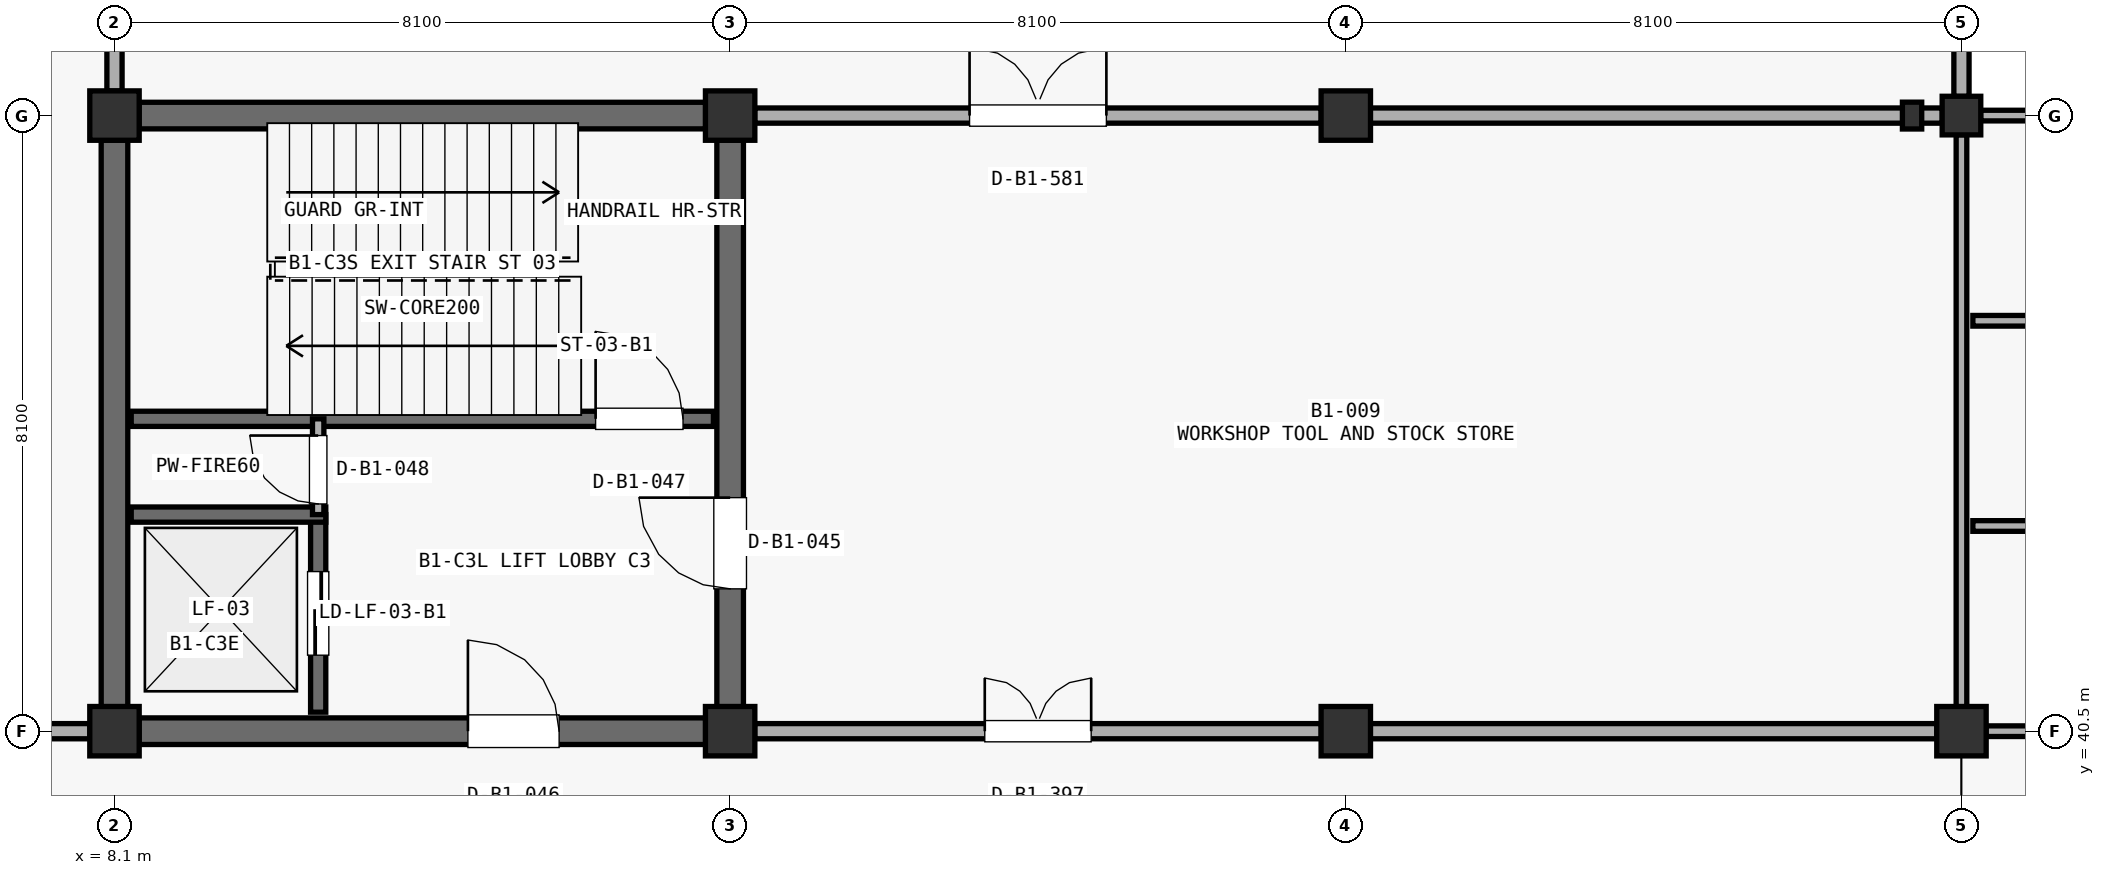
"""IFC4 building model, lengths in metres.
Left out: names, types, materials, properties, quantities, classifications, styles, units other than length and angle.
Written with IfcOpenShell. Run it as: python <this file> out.ifc"""

import sys

from ifc_helpers import new_model, si_unit, direction, frame, frame_2d, origin, origin_2d, place, context, subcontext, project, spatial, rectangle, hollow_circle, i_section, extrude, element, fill, save


model = new_model("IFC4")
c1 = context("Model", 3, precision=1e-05, world=origin(), true_north=direction((0.0, 1.0)))
c2 = subcontext(c1, "Body", "Model", "MODEL_VIEW")
j1 = project(units=[si_unit("LENGTHUNIT", "METRE"), si_unit("PLANEANGLEUNIT", "RADIAN")], contexts=[c1])
p1 = place(None, origin())
s1 = spatial("IfcSite", under=j1, at=p1, CompositionType="ELEMENT")
p2 = place(p1, origin())
s2 = spatial("IfcBuilding", under=s1, at=p2, CompositionType="ELEMENT")
p3 = place(p2, frame((0.0, 0.0, -5.1)))
s3 = spatial("IfcBuildingStorey", under=s2, at=p3, CompositionType="ELEMENT", Elevation=-5.1)
for number, where, z_axis, x_axis in (
    (1, (8.1, 40.5, 0.0), (0.0, 0.0, 1.0), (1.0, 0.0, 0.0)),
    (2, (8.1, 48.6, 0.0), (0.0, 0.0, 1.0), (1.0, 0.0, 0.0)),
    (3, (16.2, 40.5, 0.0), (0.0, 0.0, 1.0), (1.0, 0.0, 0.0)),
    (4, (16.2, 48.6, 0.0), (0.0, 0.0, 1.0), (1.0, 0.0, 0.0)),
    (5, (24.3, 40.5, 0.0), (0.0, 0.0, 1.0), (1.0, 0.0, 0.0)),
    (6, (24.3, 48.6, 0.0), (0.0, 0.0, 1.0), (1.0, 0.0, 0.0)),
    (7, (32.4, 40.5, 0.0), (0.0, 0.0, 1.0), (1.0, 0.0, 0.0)),
):
    element("IfcColumn", number, at=place(p3, frame(where, z_axis=z_axis, x_axis=x_axis)), inside=s3, PredefinedType="COLUMN", context=c2, shape_type="SweptSolid", body=[
        extrude(rectangle(XDim=0.65, YDim=0.65, at=origin_2d()), origin(), (0.0, 0.0, 1.0), 5.1),
    ])
p4 = place(p3, frame((32.4, 48.6, 0.0), z_axis=(0.0, 0.0, 1.0), x_axis=(1.0, 0.0, 0.0)))
e8 = element("IfcColumn", 8, at=p4, inside=s3, PredefinedType="COLUMN", context=c2, shape_type="SweptSolid", body=[
    extrude(hollow_circle(Radius=0.254, WallThickness=0.019, at=origin_2d()), origin(), (0.0, 0.0, 1.0), 5.1),
])
p5 = place(p3, frame((31.75, 48.6, 0.0), z_axis=(0.0, 0.0, 1.0), x_axis=(1.0, 0.0, 0.0)))
e9 = element("IfcColumn", 9, at=p5, inside=s3, PredefinedType="PILASTER", context=c2, shape_type="SweptSolid", body=[
    extrude(i_section(OverallWidth=0.254, OverallDepth=0.353, WebThickness=0.01, FlangeThickness=0.016, FilletRadius=0.016, at=origin_2d()), origin(), (0.0, 0.0, 1.0), 4.724),
])
p6 = place(p3, frame((8.423, 48.6, 0.0), z_axis=(0.0, 0.0, 1.0), x_axis=(1.0, 0.0, 0.0)))
e10 = element("IfcWall", 10, at=p6, inside=s3, PredefinedType="SHEAR", context=c2, shape_type="SweptSolid", body=[
    extrude(rectangle(XDim=7.454, YDim=0.35, at=frame_2d((3.727, 0.0))), origin(), (0.0, 0.0, 1.0), 4.722),
])
p7 = place(p3, frame((8.1, 40.823, 0.0), z_axis=(0.0, 0.0, 1.0), x_axis=(0.0, 1.0, 0.0)))
e11 = element("IfcWall", 11, at=p7, inside=s3, PredefinedType="SHEAR", context=c2, shape_type="SweptSolid", body=[
    extrude(rectangle(XDim=7.454, YDim=0.35, at=frame_2d((3.727, 0.0))), origin(), (0.0, 0.0, 1.0), 4.722),
])
p8 = place(p3, frame((16.2, 40.823, 0.0), z_axis=(0.0, 0.0, 1.0), x_axis=(0.0, 1.0, 0.0)))
e12 = element("IfcWall", 12, at=p8, inside=s3, PredefinedType="SHEAR", context=c2, shape_type="SweptSolid", body=[
    extrude(rectangle(XDim=7.454, YDim=0.35, at=frame_2d((3.727, 0.0))), origin(), (0.0, 0.0, 1.0), 4.722),
])
p9 = place(p8, frame((1.55, 0.0, 0.0)))
e13 = element("IfcOpeningElement", 13, at=p9, cuts=e12, PredefinedType="OPENING", context=c2, shape_type="SweptSolid", body=[
    extrude(rectangle(XDim=1.2, YDim=2.2, at=frame_2d((0.6, 1.1))), frame((0.0, 0.185, 0.0), z_axis=(0.0, -1.0, 0.0), x_axis=(1.0, 0.0, 0.0)), (0.0, 0.0, 1.0), 0.37),
])
p10 = place(p3, frame((8.423, 40.5, 0.0), z_axis=(0.0, 0.0, 1.0), x_axis=(1.0, 0.0, 0.0)))
e14 = element("IfcWall", 14, at=p10, inside=s3, PredefinedType="SHEAR", context=c2, shape_type="SweptSolid", body=[
    extrude(rectangle(XDim=7.454, YDim=0.35, at=frame_2d((3.727, 0.0))), origin(), (0.0, 0.0, 1.0), 4.722),
])
p11 = place(p10, frame((4.327, 0.0, 0.0)))
e15 = element("IfcOpeningElement", 15, at=p11, cuts=e14, PredefinedType="OPENING", context=c2, shape_type="SweptSolid", body=[
    extrude(rectangle(XDim=1.2, YDim=2.2, at=frame_2d((0.6, 1.1))), frame((0.0, 0.185, 0.0), z_axis=(0.0, -1.0, 0.0), x_axis=(1.0, 0.0, 0.0)), (0.0, 0.0, 1.0), 0.37),
])
p12 = place(p3, frame((8.32, 44.61, 0.0), z_axis=(0.0, 0.0, 1.0), x_axis=(1.0, 0.0, 0.0)))
e16 = element("IfcWall", 16, at=p12, inside=s3, PredefinedType="SHEAR", context=c2, shape_type="SweptSolid", body=[
    extrude(rectangle(XDim=7.66, YDim=0.2, at=frame_2d((3.83, 0.0))), origin(), (0.0, 0.0, 1.0), 4.722),
])
p13 = place(p12, frame((6.11, 0.0, 0.0)))
e17 = element("IfcOpeningElement", 17, at=p13, cuts=e16, PredefinedType="OPENING", context=c2, shape_type="SweptSolid", body=[
    extrude(rectangle(XDim=1.15, YDim=2.2, at=frame_2d((0.575, 1.1))), frame((0.0, 0.11, 0.0), z_axis=(0.0, -1.0, 0.0), x_axis=(1.0, 0.0, 0.0)), (0.0, 0.0, 1.0), 0.22),
])
p14 = place(p3, frame((10.78, 40.75, 0.0), z_axis=(0.0, 0.0, 1.0), x_axis=(0.0, 1.0, 0.0)))
e18 = element("IfcWall", 18, at=p14, inside=s3, PredefinedType="SHEAR", context=c2, shape_type="SweptSolid", body=[
    extrude(rectangle(XDim=2.6, YDim=0.2, at=frame_2d((1.3, 0.0))), origin(), (0.0, 0.0, 1.0), 4.722),
])
p15 = place(p14, frame((0.75, 0.0, 0.0)))
e19 = element("IfcOpeningElement", 19, at=p15, cuts=e18, PredefinedType="OPENING", context=c2, shape_type="SweptSolid", body=[
    extrude(rectangle(XDim=1.1, YDim=2.2, at=frame_2d((0.55, 1.1))), frame((0.0, 0.11, 0.0), z_axis=(0.0, -1.0, 0.0), x_axis=(1.0, 0.0, 0.0)), (0.0, 0.0, 1.0), 0.22),
])
p16 = place(p3, frame((8.32, 43.35, 0.0), z_axis=(0.0, 0.0, 1.0), x_axis=(1.0, 0.0, 0.0)))
e20 = element("IfcWall", 20, at=p16, inside=s3, PredefinedType="SHEAR", context=c2, shape_type="SweptSolid", body=[
    extrude(rectangle(XDim=2.56, YDim=0.2, at=frame_2d((1.28, 0.0))), origin(), (0.0, 0.0, 1.0), 4.722),
])
p17 = place(p3, frame((10.78, 43.35, 0.0), z_axis=(0.0, 0.0, 1.0), x_axis=(0.0, 1.0, 0.0)))
e21 = element("IfcWall", 21, at=p17, inside=s3, PredefinedType="PARTITIONING", context=c2, shape_type="SweptSolid", body=[
    extrude(rectangle(XDim=1.26, YDim=0.15, at=frame_2d((0.63, 0.0))), origin(), (0.0, 0.0, 1.0), 4.722),
])
p18 = place(p17, frame((0.14, 0.0, 0.0)))
e22 = element("IfcOpeningElement", 22, at=p18, cuts=e21, PredefinedType="OPENING", context=c2, shape_type="SweptSolid", body=[
    extrude(rectangle(XDim=0.9, YDim=2.15, at=frame_2d((0.45, 1.075))), frame((0.0, 0.085, 0.0), z_axis=(0.0, -1.0, 0.0), x_axis=(1.0, 0.0, 0.0)), (0.0, 0.0, 1.0), 0.17),
])
p19 = place(p3, frame((32.723, 40.5, 0.0), z_axis=(0.0, 0.0, 1.0), x_axis=(1.0, 0.0, 0.0)))
e23 = element("IfcWall", 23, at=p19, inside=s3, PredefinedType="PARTITIONING", context=c2, shape_type="SweptSolid", body=[
    extrude(rectangle(XDim=7.454, YDim=0.14, at=frame_2d((3.727, 0.0))), origin(), (0.0, 0.0, 1.0), 4.424),
])
p20 = place(p3, frame((32.652, 48.6, 0.0), z_axis=(0.0, 0.0, 1.0), x_axis=(1.0, 0.0, 0.0)))
e24 = element("IfcWall", 24, at=p20, inside=s3, PredefinedType="PARTITIONING", context=c2, shape_type="SweptSolid", body=[
    extrude(rectangle(XDim=7.525, YDim=0.14, at=frame_2d((3.762, 0.0))), origin(), (0.0, 0.0, 1.0), 4.231),
])
p21 = place(p3, frame((32.4, 40.823, 0.0), z_axis=(0.0, 0.0, 1.0), x_axis=(0.0, 1.0, 0.0)))
e25 = element("IfcWall", 25, at=p21, inside=s3, PredefinedType="PARTITIONING", context=c2, shape_type="SweptSolid", body=[
    extrude(rectangle(XDim=7.525, YDim=0.14, at=frame_2d((3.762, 0.0))), origin(), (0.0, 0.0, 1.0), 4.364),
])
for number, where, z_axis, x_axis in (
    (26, (32.55, 43.2, 0.0), (0.0, 0.0, 1.0), (1.0, 0.0, 0.0)),
    (27, (32.55, 45.9, 0.0), (0.0, 0.0, 1.0), (1.0, 0.0, 0.0)),
):
    element("IfcWall", number, at=place(p3, frame(where, z_axis=z_axis, x_axis=x_axis)), inside=s3, PredefinedType="PARTITIONING", context=c2, shape_type="SweptSolid", body=[
        extrude(rectangle(XDim=5.18, YDim=0.14, at=frame_2d((2.59, 0.0))), origin(), (0.0, 0.0, 1.0), 4.782),
    ])
p22 = place(p3, frame((32.4, 48.852, 0.0), z_axis=(0.0, 0.0, 1.0), x_axis=(0.0, 1.0, 0.0)))
e28 = element("IfcWall", 28, at=p22, inside=s3, PredefinedType="PARTITIONING", context=c2, shape_type="SweptSolid", body=[
    extrude(rectangle(XDim=7.673, YDim=0.2, at=frame_2d((3.837, 0.0))), origin(), (0.0, 0.0, 1.0), 4.173),
])
p23 = place(p3, frame((16.523, 48.6, 0.0), z_axis=(0.0, 0.0, 1.0), x_axis=(1.0, 0.0, 0.0)))
e29 = element("IfcWall", 29, at=p23, inside=s3, PredefinedType="PARTITIONING", context=c2, shape_type="SweptSolid", body=[
    extrude(rectangle(XDim=7.454, YDim=0.2, at=frame_2d((3.727, 0.0))), origin(), (0.0, 0.0, 1.0), 4.456),
])
p24 = place(p23, frame((2.827, 0.0, 0.0)))
e30 = element("IfcOpeningElement", 30, at=p24, cuts=e29, PredefinedType="OPENING", context=c2, shape_type="SweptSolid", body=[
    extrude(rectangle(XDim=1.8, YDim=2.4, at=frame_2d((0.9, 1.2))), frame((0.0, 0.11, 0.0), z_axis=(0.0, -1.0, 0.0), x_axis=(1.0, 0.0, 0.0)), (0.0, 0.0, 1.0), 0.22),
])
p25 = place(p3, frame((24.623, 48.6, 0.0), z_axis=(0.0, 0.0, 1.0), x_axis=(1.0, 0.0, 0.0)))
e31 = element("IfcWall", 31, at=p25, inside=s3, PredefinedType="PARTITIONING", context=c2, shape_type="SweptSolid", body=[
    extrude(rectangle(XDim=7.525, YDim=0.2, at=frame_2d((3.762, 0.0))), origin(), (0.0, 0.0, 1.0), 4.307),
])
p26 = place(p3, frame((8.1, 48.923, 0.0), z_axis=(0.0, 0.0, 1.0), x_axis=(0.0, 1.0, 0.0)))
e32 = element("IfcWall", 32, at=p26, inside=s3, PredefinedType="PARTITIONING", context=c2, shape_type="SweptSolid", body=[
    extrude(rectangle(XDim=7.777, YDim=0.2, at=frame_2d((3.888, 0.0))), origin(), (0.0, 0.0, 1.0), 4.722),
])
p27 = place(p26, frame((3.188, 0.0, 0.0)))
e33 = element("IfcOpeningElement", 33, at=p27, cuts=e32, PredefinedType="OPENING", context=c2, shape_type="SweptSolid", body=[
    extrude(rectangle(XDim=1.4, YDim=2.2, at=frame_2d((0.7, 1.1))), frame((0.0, 0.11, 0.0), z_axis=(0.0, -1.0, 0.0), x_axis=(1.0, 0.0, 0.0)), (0.0, 0.0, 1.0), 0.22),
])
p28 = place(p3, frame((16.523, 40.5, 0.0), z_axis=(0.0, 0.0, 1.0), x_axis=(1.0, 0.0, 0.0)))
e34 = element("IfcWall", 34, at=p28, inside=s3, PredefinedType="PARTITIONING", context=c2, shape_type="SweptSolid", body=[
    extrude(rectangle(XDim=7.454, YDim=0.2, at=frame_2d((3.727, 0.0))), origin(), (0.0, 0.0, 1.0), 4.405),
])
p29 = place(p28, frame((3.027, 0.0, 0.0)))
e35 = element("IfcOpeningElement", 35, at=p29, cuts=e34, PredefinedType="OPENING", context=c2, shape_type="SweptSolid", body=[
    extrude(rectangle(XDim=1.4, YDim=2.2, at=frame_2d((0.7, 1.1))), frame((0.0, 0.11, 0.0), z_axis=(0.0, -1.0, 0.0), x_axis=(1.0, 0.0, 0.0)), (0.0, 0.0, 1.0), 0.22),
])
p30 = place(p3, frame((24.623, 40.5, 0.0), z_axis=(0.0, 0.0, 1.0), x_axis=(1.0, 0.0, 0.0)))
e36 = element("IfcWall", 36, at=p30, inside=s3, PredefinedType="PARTITIONING", context=c2, shape_type="SweptSolid", body=[
    extrude(rectangle(XDim=7.454, YDim=0.2, at=frame_2d((3.727, 0.0))), origin(), (0.0, 0.0, 1.0), 4.456),
])
p31 = place(p3, frame((0.323, 40.5, 0.0), z_axis=(0.0, 0.0, 1.0), x_axis=(1.0, 0.0, 0.0)))
e37 = element("IfcWall", 37, at=p31, inside=s3, PredefinedType="PARTITIONING", context=c2, shape_type="SweptSolid", body=[
    extrude(rectangle(XDim=7.454, YDim=0.2, at=frame_2d((3.727, 0.0))), origin(), (0.0, 0.0, 1.0), 4.364),
])
p32 = place(p31, frame((2.827, 0.0, 0.0)))
e38 = element("IfcOpeningElement", 38, at=p32, cuts=e37, PredefinedType="OPENING", context=c2, shape_type="SweptSolid", body=[
    extrude(rectangle(XDim=1.8, YDim=2.2, at=frame_2d((0.9, 1.1))), frame((0.0, 0.11, 0.0), z_axis=(0.0, -1.0, 0.0), x_axis=(1.0, 0.0, 0.0)), (0.0, 0.0, 1.0), 0.22),
])
p33 = place(p9, origin())
e39 = element("IfcDoor", 39, at=p33, inside=s3, OperationType="SINGLE_SWING_RIGHT", PredefinedType="DOOR", context=c2, shape_type="SweptSolid", body=[
    extrude(rectangle(XDim=1.2, YDim=2.2, at=frame_2d((0.6, 1.1))), frame((0.0, 0.025, 0.0), z_axis=(0.0, -1.0, 0.0), x_axis=(1.0, 0.0, 0.0)), (0.0, 0.0, 1.0), 0.05),
])
fill(e13, e39)
p34 = place(p11, origin())
e40 = element("IfcDoor", 40, at=p34, inside=s3, OperationType="SINGLE_SWING_LEFT", PredefinedType="DOOR", context=c2, shape_type="SweptSolid", body=[
    extrude(rectangle(XDim=1.2, YDim=2.2, at=frame_2d((0.6, 1.1))), frame((0.0, 0.025, 0.0), z_axis=(0.0, -1.0, 0.0), x_axis=(1.0, 0.0, 0.0)), (0.0, 0.0, 1.0), 0.05),
])
fill(e15, e40)
p35 = place(p13, origin())
e41 = element("IfcDoor", 41, at=p35, inside=s3, OperationType="SINGLE_SWING_LEFT", PredefinedType="DOOR", context=c2, shape_type="SweptSolid", body=[
    extrude(rectangle(XDim=1.15, YDim=2.2, at=frame_2d((0.575, 1.1))), frame((0.0, 0.025, 0.0), z_axis=(0.0, -1.0, 0.0), x_axis=(1.0, 0.0, 0.0)), (0.0, 0.0, 1.0), 0.05),
])
fill(e17, e41)
p36 = place(p15, origin())
e42 = element("IfcDoor", 42, at=p36, inside=s3, OperationType="SLIDING_TO_LEFT", PredefinedType="DOOR", context=c2, shape_type="SweptSolid", body=[
    extrude(rectangle(XDim=1.1, YDim=2.2, at=frame_2d((0.55, 1.1))), frame((0.0, 0.025, 0.0), z_axis=(0.0, -1.0, 0.0), x_axis=(1.0, 0.0, 0.0)), (0.0, 0.0, 1.0), 0.05),
])
fill(e19, e42)
p37 = place(p18, origin())
e43 = element("IfcDoor", 43, at=p37, inside=s3, OperationType="SINGLE_SWING_RIGHT", PredefinedType="DOOR", context=c2, shape_type="SweptSolid", body=[
    extrude(rectangle(XDim=0.9, YDim=2.15, at=frame_2d((0.45, 1.075))), frame((0.0, 0.025, 0.0), z_axis=(0.0, -1.0, 0.0), x_axis=(1.0, 0.0, 0.0)), (0.0, 0.0, 1.0), 0.05),
])
fill(e22, e43)
p38 = place(p29, origin())
e44 = element("IfcDoor", 44, at=p38, inside=s3, OperationType="DOUBLE_SWING_LEFT", PredefinedType="DOOR", context=c2, shape_type="SweptSolid", body=[
    extrude(rectangle(XDim=1.4, YDim=2.2, at=frame_2d((0.7, 1.1))), frame((0.0, 0.025, 0.0), z_axis=(0.0, -1.0, 0.0), x_axis=(1.0, 0.0, 0.0)), (0.0, 0.0, 1.0), 0.05),
])
fill(e35, e44)
p39 = place(p24, origin())
e45 = element("IfcDoor", 45, at=p39, inside=s3, OperationType="DOUBLE_SWING_LEFT", PredefinedType="DOOR", context=c2, shape_type="SweptSolid", body=[
    extrude(rectangle(XDim=1.8, YDim=2.4, at=frame_2d((0.9, 1.2))), frame((0.0, 0.025, 0.0), z_axis=(0.0, -1.0, 0.0), x_axis=(1.0, 0.0, 0.0)), (0.0, 0.0, 1.0), 0.05),
])
fill(e30, e45)
save(model, sys.argv[1])
